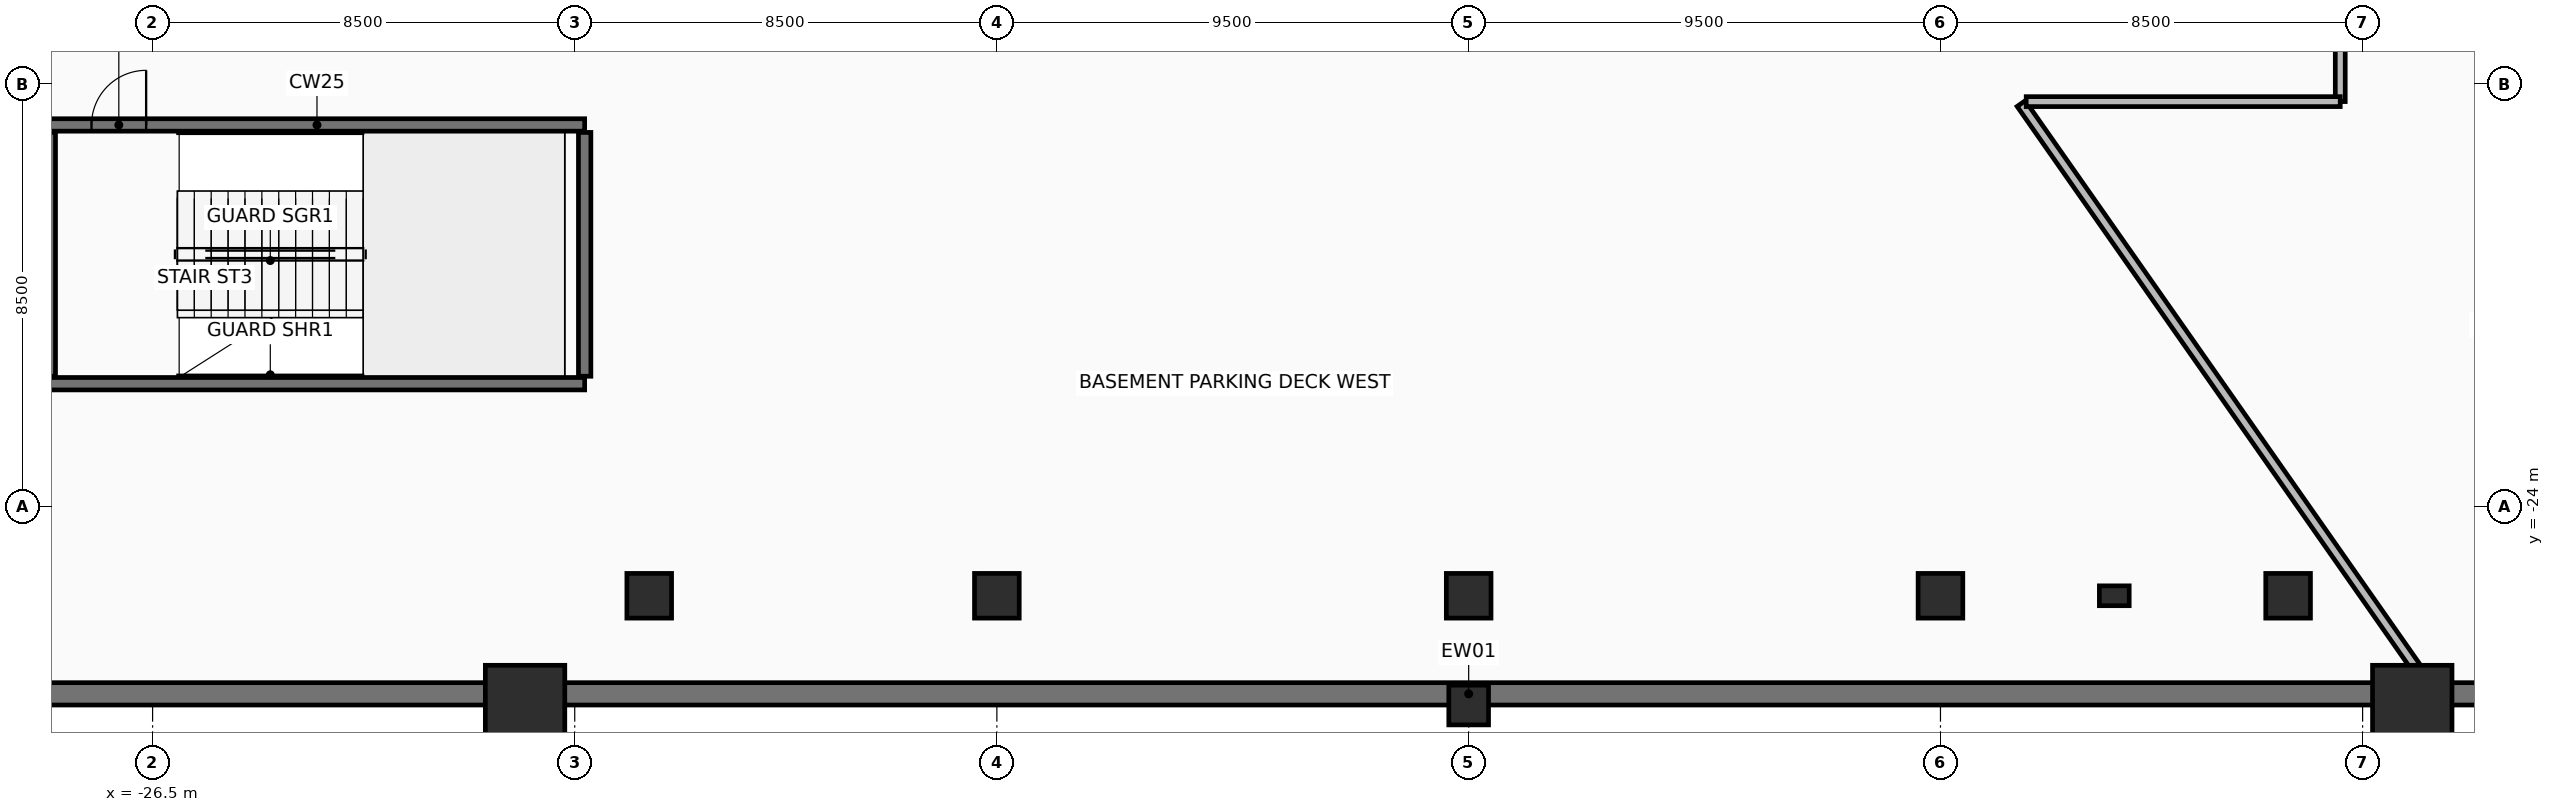
"""IFC4 building model, lengths in metres.
Left out: names, types, materials, properties, quantities, classifications, styles, units other than length and angle.
Written with IfcOpenShell. Run it as: python <this file> out.ifc"""

import sys

from ifc_helpers import new_model, si_unit, direction, frame, frame_2d, origin, origin_2d, place, context, subcontext, project, spatial, rectangle, hollow_rectangle, extrude, element, fill, save


model = new_model("IFC4")
c1 = context("Model", 3, precision=1e-05, world=origin(), true_north=direction((0.0, 1.0)))
c2 = subcontext(c1, "Body", "Model", "MODEL_VIEW")
j1 = project(units=[si_unit("LENGTHUNIT", "METRE"), si_unit("PLANEANGLEUNIT", "RADIAN")], contexts=[c1])
p1 = place(None, origin())
s1 = spatial("IfcSite", under=j1, at=p1, CompositionType="ELEMENT")
p2 = place(p1, origin())
s2 = spatial("IfcBuilding", under=s1, at=p2, CompositionType="ELEMENT")
p3 = place(p2, frame((0.0, 0.0, -4.5)))
s3 = spatial("IfcBuildingStorey", under=s2, at=p3, CompositionType="ELEMENT", Elevation=-4.5)
p4 = place(p3, frame((13.0, -25.8, 0.0), z_axis=(0.0, 0.0, 1.0), x_axis=(1.0, 0.0, 0.0)))
e1 = element("IfcColumn", 1, at=p4, inside=s3, PredefinedType="PILASTER", context=c2, shape_type="SweptSolid", body=[
    extrude(rectangle(XDim=0.6, YDim=0.4, at=origin_2d()), origin(), (0.0, 0.0, 1.0), 4.5),
])
for number, where, z_axis, x_axis in (
    (2, (-16.5, -25.8, 0.0), (0.0, 0.0, 1.0), (1.0, 0.0, 0.0)),
    (3, (-9.5, -25.8, 0.0), (0.0, 0.0, 1.0), (1.0, 0.0, 0.0)),
    (4, (0.0, -25.8, 0.0), (0.0, 0.0, 1.0), (1.0, 0.0, 0.0)),
    (5, (9.5, -25.8, 0.0), (0.0, 0.0, 1.0), (1.0, 0.0, 0.0)),
    (6, (16.5, -25.8, 0.0), (0.0, 0.0, 1.0), (1.0, 0.0, 0.0)),
):
    element("IfcColumn", number, at=place(p3, frame(where, z_axis=z_axis, x_axis=x_axis)), inside=s3, PredefinedType="COLUMN", context=c2, shape_type="SweptSolid", body=[
        extrude(hollow_rectangle(XDim=0.9, YDim=0.9, WallThickness=0.05, at=origin_2d()), origin(), (0.0, 0.0, 1.0), 4.5),
    ])
for number, where, z_axis, x_axis in (
    (7, (-19.0, -28.0, 0.0), (0.0, 0.0, 1.0), (1.0, 0.0, 0.0)),
    (8, (19.0, -28.0, 0.0), (0.0, 0.0, 1.0), (1.0, 0.0, 0.0)),
):
    element("IfcColumn", number, at=place(p3, frame(where, z_axis=z_axis, x_axis=x_axis)), inside=s3, PredefinedType="COLUMN", context=c2, shape_type="SweptSolid", body=[
        extrude(rectangle(XDim=1.6, YDim=1.6, at=origin_2d()), origin(), (0.0, 0.0, 1.0), 4.5),
    ])
p5 = place(p3, frame((0.0, -28.0, 0.0), z_axis=(0.0, 0.0, 1.0), x_axis=(1.0, 0.0, 0.0)))
e9 = element("IfcColumn", 9, at=p5, inside=s3, PredefinedType="COLUMN", context=c2, shape_type="SweptSolid", body=[
    extrude(hollow_rectangle(XDim=0.8, YDim=0.8, WallThickness=0.045, at=origin_2d()), origin(), (0.0, 0.0, 1.0), 4.2),
])
p6 = place(p3, frame((-42.775, -27.775, 0.0), z_axis=(0.0, 0.0, 1.0), x_axis=(1.0, 0.0, 0.0)))
e10 = element("IfcWall", 10, at=p6, inside=s3, PredefinedType="STANDARD", context=c2, shape_type="SweptSolid", body=[
    extrude(rectangle(XDim=85.55, YDim=0.45, at=frame_2d((42.775, 0.0))), origin(), (0.0, 0.0, 1.0), 4.2),
])
p7 = place(p3, frame((-28.58, -16.32, 0.0), z_axis=(0.0, 0.0, 1.0), x_axis=(1.0, 0.0, 0.0)))
e11 = element("IfcWall", 11, at=p7, inside=s3, PredefinedType="SHEAR", context=c2, shape_type="SweptSolid", body=[
    extrude(rectangle(XDim=10.78, YDim=0.25, at=frame_2d((5.39, 0.0))), origin(), (0.0, 0.0, 1.0), 4.2),
])
p8 = place(p7, frame((0.85, 0.0, 0.0)))
e12 = element("IfcOpeningElement", 12, at=p8, cuts=e11, PredefinedType="OPENING", context=c2, shape_type="SweptSolid", body=[
    extrude(rectangle(XDim=1.1, YDim=2.15, at=frame_2d((0.55, 1.075))), frame((0.0, 0.135, 0.0), z_axis=(0.0, -1.0, 0.0), x_axis=(1.0, 0.0, 0.0)), (0.0, 0.0, 1.0), 0.27),
])
p9 = place(p3, frame((-28.58, -21.53, 0.0), z_axis=(0.0, 0.0, 1.0), x_axis=(1.0, 0.0, 0.0)))
e13 = element("IfcWall", 13, at=p9, inside=s3, PredefinedType="SHEAR", context=c2, shape_type="SweptSolid", body=[
    extrude(rectangle(XDim=10.78, YDim=0.25, at=frame_2d((5.39, 0.0))), origin(), (0.0, 0.0, 1.0), 4.2),
])
for number, where, z_axis, x_axis in (
    (14, (-28.58, -21.38, 0.0), (0.0, 0.0, 1.0), (0.0, 1.0, 0.0)),
    (15, (-17.8, -21.38, 0.0), (0.0, 0.0, 1.0), (0.0, 1.0, 0.0)),
):
    element("IfcWall", number, at=place(p3, frame(where, z_axis=z_axis, x_axis=x_axis)), inside=s3, PredefinedType="SHEAR", context=c2, shape_type="SweptSolid", body=[
        extrude(rectangle(XDim=4.91, YDim=0.25, at=frame_2d((2.455, 0.0))), origin(), (0.0, 0.0, 1.0), 4.2),
    ])
p10 = place(p3, frame((17.55, -15.849, 0.0), z_axis=(0.0, 0.0, 1.0), x_axis=(0.0, 1.0, 0.0)))
e16 = element("IfcWall", 16, at=p10, inside=s3, PredefinedType="PARTITIONING", context=c2, shape_type="SweptSolid", body=[
    extrude(rectangle(XDim=15.824, YDim=0.2, at=frame_2d((7.912, 0.0))), origin(), (0.0, 0.0, 1.0), 3.545),
])
p11 = place(p10, frame((7.462, 0.0, 0.0)))
e17 = element("IfcOpeningElement", 17, at=p11, cuts=e16, PredefinedType="OPENING", context=c2, shape_type="SweptSolid", body=[
    extrude(rectangle(XDim=0.9, YDim=2.1, at=frame_2d((0.45, 1.05))), frame((0.0, 0.11, 0.0), z_axis=(0.0, -1.0, 0.0), x_axis=(1.0, 0.0, 0.0)), (0.0, 0.0, 1.0), 0.22),
])
p12 = place(p3, frame((19.287, -27.545, 0.0), z_axis=(0.0, 0.0, 1.0), x_axis=(-0.573592461677, 0.819140823001, 0.0)))
e18 = element("IfcWall", 18, at=p12, inside=s3, PredefinedType="PARTITIONING", context=c2, shape_type="SweptSolid", body=[
    extrude(rectangle(XDim=14.229, YDim=0.2, at=frame_2d((7.115, 0.0))), origin(), (0.0, 0.0, 1.0), 3.295),
])
p13 = place(p3, frame((11.227, -15.85, 0.0), z_axis=(0.0, 0.0, 1.0), x_axis=(1.0, 0.0, 0.0)))
e19 = element("IfcWall", 19, at=p13, inside=s3, PredefinedType="PARTITIONING", context=c2, shape_type="SweptSolid", body=[
    extrude(rectangle(XDim=6.323, YDim=0.2, at=frame_2d((3.161, 0.0))), origin(), (0.0, 0.0, 1.0), 3.545),
])
p14 = place(p8, frame((1.1, 0.0, 0.0), z_axis=(0.0, 0.0, 1.0), x_axis=(-1.0, 0.0, 0.0)))
e20 = element("IfcDoor", 20, at=p14, inside=s3, OperationType="SINGLE_SWING_LEFT", PredefinedType="DOOR", context=c2, shape_type="SweptSolid", body=[
    extrude(rectangle(XDim=1.1, YDim=2.15, at=frame_2d((0.55, 1.075))), frame((0.0, 0.025, 0.0), z_axis=(0.0, -1.0, 0.0), x_axis=(1.0, 0.0, 0.0)), (0.0, 0.0, 1.0), 0.05),
])
fill(e12, e20)
save(model, sys.argv[1])
